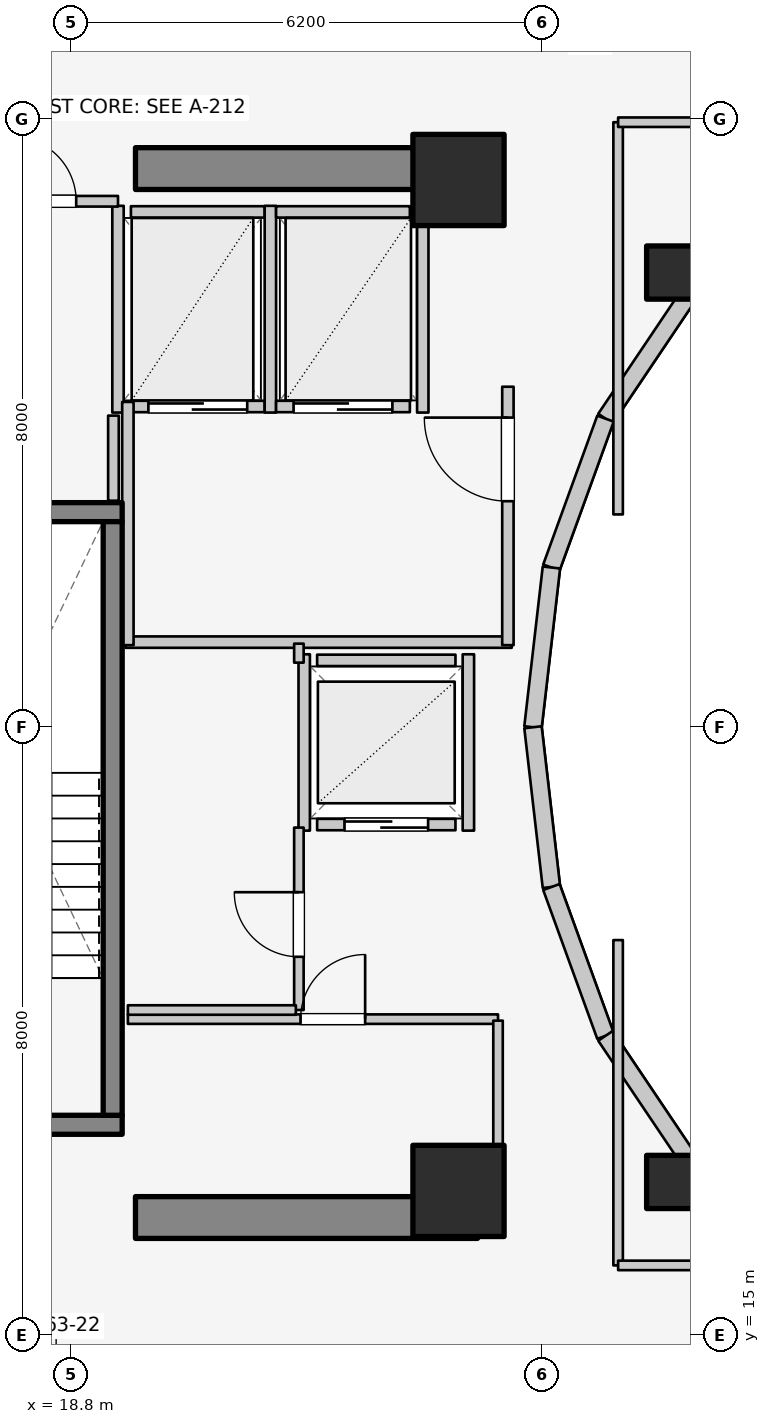
"""IFC4 building model, lengths in metres.
Left out: names, types, materials, properties, quantities, classifications, styles, units other than length and angle.
Written with IfcOpenShell. Run it as: python <this file> out.ifc"""

import sys

from ifc_helpers import new_model, si_unit, direction, frame, frame_2d, origin, origin_2d, place, context, subcontext, project, spatial, rectangle, extrude, element, fill, save


model = new_model("IFC4")
c1 = context("Model", 3, precision=1e-05, world=origin(), true_north=direction((0.0, 1.0)))
c2 = subcontext(c1, "Body", "Model", "MODEL_VIEW")
j1 = project(units=[si_unit("LENGTHUNIT", "METRE"), si_unit("PLANEANGLEUNIT", "RADIAN")], contexts=[c1])
p1 = place(None, origin())
s1 = spatial("IfcSite", under=j1, at=p1, CompositionType="ELEMENT")
p2 = place(p1, origin())
s2 = spatial("IfcBuilding", under=s1, at=p2, CompositionType="ELEMENT")
p3 = place(p2, frame((0.0, 0.0, 207.8)))
s3 = spatial("IfcBuildingStorey", under=s2, at=p3, CompositionType="ELEMENT", Elevation=207.8)
for number, where, z_axis, x_axis in (
    (1, (19.65, 16.55, 0.0), (0.0, 0.0, 1.0), (1.0, 0.0, 0.0)),
    (2, (19.65, 30.35, 0.0), (0.0, 0.0, 1.0), (1.0, 0.0, 0.0)),
):
    element("IfcWall", number, at=place(p3, frame(where, z_axis=z_axis, x_axis=x_axis)), inside=s3, PredefinedType="SHEAR", context=c2, shape_type="SweptSolid", body=[
        extrude(rectangle(XDim=4.5, YDim=0.55, at=frame_2d((2.25, 0.0))), origin(), (0.0, 0.0, 1.0), 3.1),
    ])
p4 = place(p3, frame((16.105, 17.77, 0.0), z_axis=(0.0, 0.0, 1.0), x_axis=(1.0, 0.0, 0.0)))
e3 = element("IfcWall", 3, at=p4, inside=s3, PredefinedType="SOLIDWALL", context=c2, shape_type="SweptSolid", body=[
    extrude(rectangle(XDim=3.37, YDim=0.25, at=frame_2d((1.685, 0.0))), origin(), (0.0, 0.0, 1.0), 3.1),
])
p5 = place(p4, frame((1.135, 0.0, 0.0)))
e4 = element("IfcOpeningElement", 4, at=p5, cuts=e3, PredefinedType="OPENING", context=c2, shape_type="SweptSolid", body=[
    extrude(rectangle(XDim=1.1, YDim=2.1, at=frame_2d((0.55, 1.05))), frame((0.0, 0.135, 0.0), z_axis=(0.0, -1.0, 0.0), x_axis=(1.0, 0.0, 0.0)), (0.0, 0.0, 1.0), 0.27),
])
p6 = place(p3, frame((16.105, 25.83, 0.0), z_axis=(0.0, 0.0, 1.0), x_axis=(1.0, 0.0, 0.0)))
e5 = element("IfcWall", 5, at=p6, inside=s3, PredefinedType="SOLIDWALL", context=c2, shape_type="SweptSolid", body=[
    extrude(rectangle(XDim=3.37, YDim=0.25, at=frame_2d((1.685, 0.0))), origin(), (0.0, 0.0, 1.0), 3.1),
])
p7 = place(p3, frame((19.35, 17.895, 0.0), z_axis=(0.0, 0.0, 1.0), x_axis=(0.0, 1.0, 0.0)))
e6 = element("IfcWall", 6, at=p7, inside=s3, PredefinedType="SOLIDWALL", context=c2, shape_type="SweptSolid", body=[
    extrude(rectangle(XDim=7.81, YDim=0.25, at=frame_2d((3.905, 0.0))), origin(), (0.0, 0.0, 1.0), 3.1),
])
for number, where, z_axis, x_axis in (
    (7, (23.9, 16.9, 0.0), (0.0, 0.0, 1.0), (1.0, 0.0, 0.0)),
    (8, (23.9, 30.2, 0.0), (0.0, 0.0, 1.0), (1.0, 0.0, 0.0)),
):
    element("IfcColumn", number, at=place(p3, frame(where, z_axis=z_axis, x_axis=x_axis)), inside=s3, PredefinedType="COLUMN", context=c2, shape_type="SweptSolid", body=[
        extrude(rectangle(XDim=1.2, YDim=1.2, at=origin_2d()), origin(), (0.0, 0.0, 1.0), 3.1),
    ])
for number, where, z_axis, x_axis in (
    (9, (26.725, 28.982, 0.0), (0.0, 0.0, 1.0), (1.0, 0.0, 0.0)),
    (10, (26.725, 17.018, 0.0), (0.0, 0.0, 1.0), (1.0, 0.0, 0.0)),
):
    element("IfcColumn", number, at=place(p3, frame(where, z_axis=z_axis, x_axis=x_axis)), inside=s3, PredefinedType="COLUMN", context=c2, shape_type="SweptSolid", body=[
        extrude(rectangle(XDim=0.7, YDim=0.7, at=origin_2d()), origin(), (0.0, 0.0, 1.0), 3.1),
    ])
p8 = place(p3, frame((28.44, 30.032, 0.0), z_axis=(0.0, 0.0, 1.0), x_axis=(-0.752576694707, -0.658504607869, 0.0)))
e11 = element("IfcWall", 11, at=p8, inside=s3, PredefinedType="STANDARD", context=c2, shape_type="SweptSolid", body=[
    extrude(rectangle(XDim=1.959, YDim=0.23, at=frame_2d((0.98, 0.0))), origin(), (0.0, 0.0, 1.0), 1.22),
])
p9 = place(p3, frame((26.965, 28.742, 0.0), z_axis=(0.0, 0.0, 1.0), x_axis=(-0.558197800898, -0.829707909492, 0.0)))
e12 = element("IfcWall", 12, at=p9, inside=s3, PredefinedType="STANDARD", context=c2, shape_type="SweptSolid", body=[
    extrude(rectangle(XDim=2.027, YDim=0.23, at=frame_2d((1.013, 0.0))), origin(), (0.0, 0.0, 1.0), 1.22),
])
p10 = place(p3, frame((25.834, 27.06, 0.0), z_axis=(0.0, 0.0, 1.0), x_axis=(-0.341423187295, -0.93990968033, 0.0)))
e13 = element("IfcWall", 13, at=p10, inside=s3, PredefinedType="STANDARD", context=c2, shape_type="SweptSolid", body=[
    extrude(rectangle(XDim=2.084, YDim=0.23, at=frame_2d((1.042, 0.0))), origin(), (0.0, 0.0, 1.0), 2.56),
])
for number, where, z_axis, x_axis in (
    (14, (25.123, 25.102, 0.0), (0.0, 0.0, 1.0), (-0.115, -0.993, 0.0)),
    (15, (24.88, 23.0, 0.0), (0.0, 0.0, 1.0), (0.115, -0.993, 0.0)),
):
    element("IfcWall", number, at=place(p3, frame(where, z_axis=z_axis, x_axis=x_axis)), inside=s3, PredefinedType="STANDARD", context=c2, shape_type="SweptSolid", body=[
        extrude(rectangle(XDim=2.115, YDim=0.23, at=frame_2d((1.058, 0.0))), origin(), (0.0, 0.0, 1.0), 2.56),
    ])
p11 = place(p3, frame((25.123, 20.898, 0.0), z_axis=(0.0, 0.0, 1.0), x_axis=(0.341423187295, -0.93990968033, 0.0)))
e16 = element("IfcWall", 16, at=p11, inside=s3, PredefinedType="STANDARD", context=c2, shape_type="SweptSolid", body=[
    extrude(rectangle(XDim=2.084, YDim=0.23, at=frame_2d((1.042, 0.0))), origin(), (0.0, 0.0, 1.0), 2.56),
])
p12 = place(p3, frame((25.834, 18.94, 0.0), z_axis=(0.0, 0.0, 1.0), x_axis=(0.558197800898, -0.829707909492, 0.0)))
e17 = element("IfcWall", 17, at=p12, inside=s3, PredefinedType="STANDARD", context=c2, shape_type="SweptSolid", body=[
    extrude(rectangle(XDim=2.027, YDim=0.23, at=frame_2d((1.013, 0.0))), origin(), (0.0, 0.0, 1.0), 1.22),
])
p13 = place(p3, frame((26.965, 17.258, 0.0), z_axis=(0.0, 0.0, 1.0), x_axis=(0.752576694707, -0.658504607869, 0.0)))
e18 = element("IfcWall", 18, at=p13, inside=s3, PredefinedType="STANDARD", context=c2, shape_type="SweptSolid", body=[
    extrude(rectangle(XDim=1.959, YDim=0.23, at=frame_2d((0.98, 0.0))), origin(), (0.0, 0.0, 1.0), 1.22),
])
p14 = place(p3, frame((22.04, 21.72, 0.0), z_axis=(0.0, 0.0, 1.0), x_axis=(1.0, 0.0, 0.0)))
e19 = element("IfcWall", 19, at=p14, inside=s3, PredefinedType="SOLIDWALL", context=c2, shape_type="SweptSolid", body=[
    extrude(rectangle(XDim=1.82, YDim=0.15, at=frame_2d((0.91, 0.0))), origin(), (0.0, 0.0, 1.0), 2.12),
])
p15 = place(p14, frame((0.36, 0.0, 0.0)))
e20 = element("IfcOpeningElement", 20, at=p15, cuts=e19, PredefinedType="OPENING", context=c2, shape_type="SweptSolid", body=[
    extrude(rectangle(XDim=1.1, YDim=2.1, at=frame_2d((0.55, 1.05))), frame((0.0, 0.085, 0.0), z_axis=(0.0, -1.0, 0.0), x_axis=(1.0, 0.0, 0.0)), (0.0, 0.0, 1.0), 0.17),
])
p16 = place(p3, frame((22.04, 23.88, 0.0), z_axis=(0.0, 0.0, 1.0), x_axis=(1.0, 0.0, 0.0)))
e21 = element("IfcWall", 21, at=p16, inside=s3, PredefinedType="SOLIDWALL", context=c2, shape_type="SweptSolid", body=[
    extrude(rectangle(XDim=1.82, YDim=0.15, at=frame_2d((0.91, 0.0))), origin(), (0.0, 0.0, 1.0), 2.12),
])
p17 = place(p3, frame((21.87, 21.64, 0.0), z_axis=(0.0, 0.0, 1.0), x_axis=(0.0, 1.0, 0.0)))
e22 = element("IfcWall", 22, at=p17, inside=s3, PredefinedType="SOLIDWALL", context=c2, shape_type="SweptSolid", body=[
    extrude(rectangle(XDim=2.32, YDim=0.15, at=frame_2d((1.16, 0.0))), origin(), (0.0, 0.0, 1.0), 2.575),
])
p18 = place(p3, frame((24.03, 21.64, 0.0), z_axis=(0.0, 0.0, 1.0), x_axis=(0.0, 1.0, 0.0)))
e23 = element("IfcWall", 23, at=p18, inside=s3, PredefinedType="SOLIDWALL", context=c2, shape_type="SweptSolid", body=[
    extrude(rectangle(XDim=2.32, YDim=0.15, at=frame_2d((1.16, 0.0))), origin(), (0.0, 0.0, 1.0), 2.12),
])
p19 = place(p3, frame((19.59, 27.22, 0.0), z_axis=(0.0, 0.0, 1.0), x_axis=(1.0, 0.0, 0.0)))
e24 = element("IfcWall", 24, at=p19, inside=s3, PredefinedType="SOLIDWALL", context=c2, shape_type="SweptSolid", body=[
    extrude(rectangle(XDim=1.76, YDim=0.15, at=frame_2d((0.88, 0.0))), origin(), (0.0, 0.0, 1.0), 2.575),
])
p20 = place(p19, frame((0.23, 0.0, 0.0)))
e25 = element("IfcOpeningElement", 25, at=p20, cuts=e24, PredefinedType="OPENING", context=c2, shape_type="SweptSolid", body=[
    extrude(rectangle(XDim=1.3, YDim=2.1, at=frame_2d((0.65, 1.05))), frame((0.0, 0.085, 0.0), z_axis=(0.0, -1.0, 0.0), x_axis=(1.0, 0.0, 0.0)), (0.0, 0.0, 1.0), 0.17),
])
p21 = place(p3, frame((19.59, 29.78, 0.0), z_axis=(0.0, 0.0, 1.0), x_axis=(1.0, 0.0, 0.0)))
e26 = element("IfcWall", 26, at=p21, inside=s3, PredefinedType="SOLIDWALL", context=c2, shape_type="SweptSolid", body=[
    extrude(rectangle(XDim=1.76, YDim=0.15, at=frame_2d((0.88, 0.0))), origin(), (0.0, 0.0, 1.0), 2.575),
])
for number, where, z_axis, x_axis in (
    (27, (19.42, 27.14, 0.0), (0.0, 0.0, 1.0), (0.0, 1.0, 0.0)),
    (28, (21.425, 27.14, 0.0), (0.0, 0.0, 1.0), (0.0, 1.0, 0.0)),
):
    element("IfcWall", number, at=place(p3, frame(where, z_axis=z_axis, x_axis=x_axis)), inside=s3, PredefinedType="SOLIDWALL", context=c2, shape_type="SweptSolid", body=[
        extrude(rectangle(XDim=2.72, YDim=0.15, at=frame_2d((1.36, 0.0))), origin(), (0.0, 0.0, 1.0), 2.575),
    ])
p22 = place(p3, frame((21.5, 27.22, 0.0), z_axis=(0.0, 0.0, 1.0), x_axis=(1.0, 0.0, 0.0)))
e29 = element("IfcWall", 29, at=p22, inside=s3, PredefinedType="SOLIDWALL", context=c2, shape_type="SweptSolid", body=[
    extrude(rectangle(XDim=1.76, YDim=0.15, at=frame_2d((0.88, 0.0))), origin(), (0.0, 0.0, 1.0), 2.575),
])
p23 = place(p22, frame((0.23, 0.0, 0.0)))
e30 = element("IfcOpeningElement", 30, at=p23, cuts=e29, PredefinedType="OPENING", context=c2, shape_type="SweptSolid", body=[
    extrude(rectangle(XDim=1.3, YDim=2.1, at=frame_2d((0.65, 1.05))), frame((0.0, 0.085, 0.0), z_axis=(0.0, -1.0, 0.0), x_axis=(1.0, 0.0, 0.0)), (0.0, 0.0, 1.0), 0.17),
])
p24 = place(p3, frame((21.5, 29.78, 0.0), z_axis=(0.0, 0.0, 1.0), x_axis=(1.0, 0.0, 0.0)))
e31 = element("IfcWall", 31, at=p24, inside=s3, PredefinedType="SOLIDWALL", context=c2, shape_type="SweptSolid", body=[
    extrude(rectangle(XDim=1.76, YDim=0.15, at=frame_2d((0.88, 0.0))), origin(), (0.0, 0.0, 1.0), 2.575),
])
p25 = place(p3, frame((23.43, 27.14, 0.0), z_axis=(0.0, 0.0, 1.0), x_axis=(0.0, 1.0, 0.0)))
e32 = element("IfcWall", 32, at=p25, inside=s3, PredefinedType="SOLIDWALL", context=c2, shape_type="SweptSolid", body=[
    extrude(rectangle(XDim=2.72, YDim=0.15, at=frame_2d((1.36, 0.0))), origin(), (0.0, 0.0, 1.0), 2.575),
])
p26 = place(p3, frame((19.52, 24.12, 0.0), z_axis=(0.0, 0.0, 1.0), x_axis=(1.0, 0.0, 0.0)))
e33 = element("IfcWall", 33, at=p26, inside=s3, PredefinedType="PARTITIONING", context=c2, shape_type="SweptSolid", body=[
    extrude(rectangle(XDim=5.08, YDim=0.15, at=frame_2d((2.54, 0.0))), origin(), (0.0, 0.0, 1.0), 2.12),
])
p27 = place(p3, frame((19.55, 24.08, 0.0), z_axis=(0.0, 0.0, 1.0), x_axis=(0.0, 1.0, 0.0)))
e34 = element("IfcWall", 34, at=p27, inside=s3, PredefinedType="PARTITIONING", context=c2, shape_type="SweptSolid", body=[
    extrude(rectangle(XDim=3.2, YDim=0.15, at=frame_2d((1.6, 0.0))), origin(), (0.0, 0.0, 1.0), 2.575),
])
p28 = place(p3, frame((24.55, 24.08, 0.0), z_axis=(0.0, 0.0, 1.0), x_axis=(0.0, 1.0, 0.0)))
e35 = element("IfcWall", 35, at=p28, inside=s3, PredefinedType="PARTITIONING", context=c2, shape_type="SweptSolid", body=[
    extrude(rectangle(XDim=3.4, YDim=0.15, at=frame_2d((1.7, 0.0))), origin(), (0.0, 0.0, 1.0), 2.575),
])
p29 = place(p28, frame((1.894, 0.0, 0.0)))
e36 = element("IfcOpeningElement", 36, at=p29, cuts=e35, PredefinedType="OPENING", context=c2, shape_type="SweptSolid", body=[
    extrude(rectangle(XDim=1.1, YDim=2.1, at=frame_2d((0.55, 1.05))), frame((0.0, 0.085, 0.0), z_axis=(0.0, -1.0, 0.0), x_axis=(1.0, 0.0, 0.0)), (0.0, 0.0, 1.0), 0.17),
])
p30 = place(p3, frame((19.55, 19.16, 0.0), z_axis=(0.0, 0.0, 1.0), x_axis=(1.0, 0.0, 0.0)))
e37 = element("IfcWall", 37, at=p30, inside=s3, PredefinedType="PARTITIONING", context=c2, shape_type="SweptSolid", body=[
    extrude(rectangle(XDim=4.87, YDim=0.125, at=frame_2d((2.435, 0.0))), origin(), (0.0, 0.0, 1.0), 2.12),
])
p31 = place(p30, frame((2.272, 0.0, 0.0)))
e38 = element("IfcOpeningElement", 38, at=p31, cuts=e37, PredefinedType="OPENING", context=c2, shape_type="SweptSolid", body=[
    extrude(rectangle(XDim=0.85, YDim=2.05, at=frame_2d((0.425, 1.025))), frame((0.0, 0.073, 0.0), z_axis=(0.0, -1.0, 0.0), x_axis=(1.0, 0.0, 0.0)), (0.0, 0.0, 1.0), 0.145),
])
p32 = place(p3, frame((24.42, 17.1, 0.0), z_axis=(0.0, 0.0, 1.0), x_axis=(0.0, 1.0, 0.0)))
e39 = element("IfcWall", 39, at=p32, inside=s3, PredefinedType="PARTITIONING", context=c2, shape_type="SweptSolid", body=[
    extrude(rectangle(XDim=2.04, YDim=0.125, at=frame_2d((1.02, 0.0))), origin(), (0.0, 0.0, 1.0), 1.952),
])
p33 = place(p3, frame((21.8, 19.28, 0.0), z_axis=(0.0, 0.0, 1.0), x_axis=(0.0, 1.0, 0.0)))
e40 = element("IfcWall", 40, at=p33, inside=s3, PredefinedType="PARTITIONING", context=c2, shape_type="SweptSolid", body=[
    extrude(rectangle(XDim=2.4, YDim=0.125, at=frame_2d((1.2, 0.0))), origin(), (0.0, 0.0, 1.0), 2.575),
])
p34 = place(p33, frame((0.7, 0.0, 0.0)))
e41 = element("IfcOpeningElement", 41, at=p34, cuts=e40, PredefinedType="OPENING", context=c2, shape_type="SweptSolid", body=[
    extrude(rectangle(XDim=0.85, YDim=2.05, at=frame_2d((0.425, 1.025))), frame((0.0, 0.073, 0.0), z_axis=(0.0, -1.0, 0.0), x_axis=(1.0, 0.0, 0.0)), (0.0, 0.0, 1.0), 0.145),
])
p35 = place(p3, frame((21.8, 23.85, 0.0), z_axis=(0.0, 0.0, 1.0), x_axis=(0.0, 1.0, 0.0)))
e42 = element("IfcWall", 42, at=p35, inside=s3, PredefinedType="PARTITIONING", context=c2, shape_type="SweptSolid", body=[
    extrude(rectangle(XDim=0.25, YDim=0.125, at=frame_2d((0.125, 0.0))), origin(), (0.0, 0.0, 1.0), 2.575),
])
p36 = place(p3, frame((19.55, 19.28, 0.0), z_axis=(0.0, 0.0, 1.0), x_axis=(1.0, 0.0, 0.0)))
e43 = element("IfcWall", 43, at=p36, inside=s3, PredefinedType="PARTITIONING", context=c2, shape_type="SweptSolid", body=[
    extrude(rectangle(XDim=2.21, YDim=0.125, at=frame_2d((1.105, 0.0))), origin(), (0.0, 0.0, 1.0), 2.12),
])
p37 = place(p3, frame((17.52, 29.92, 0.0), z_axis=(0.0, 0.0, 1.0), x_axis=(1.0, 0.0, 0.0)))
e44 = element("IfcWall", 44, at=p37, inside=s3, PredefinedType="PLUMBINGWALL", context=c2, shape_type="SweptSolid", body=[
    extrude(rectangle(XDim=1.9, YDim=0.14, at=frame_2d((0.95, 0.0))), origin(), (0.0, 0.0, 1.0), 2.575),
])
p38 = place(p37, frame((0.5, 0.0, 0.0)))
e45 = element("IfcOpeningElement", 45, at=p38, cuts=e44, PredefinedType="OPENING", context=c2, shape_type="SweptSolid", body=[
    extrude(rectangle(XDim=0.85, YDim=2.05, at=frame_2d((0.425, 1.025))), frame((0.0, 0.08, 0.0), z_axis=(0.0, -1.0, 0.0), x_axis=(1.0, 0.0, 0.0)), (0.0, 0.0, 1.0), 0.16),
])
p39 = place(p3, frame((19.36, 25.98, 0.0), z_axis=(0.0, 0.0, 1.0), x_axis=(0.0, 1.0, 0.0)))
e46 = element("IfcWall", 46, at=p39, inside=s3, PredefinedType="PLUMBINGWALL", context=c2, shape_type="SweptSolid", body=[
    extrude(rectangle(XDim=1.12, YDim=0.14, at=frame_2d((0.56, 0.0))), origin(), (0.0, 0.0, 1.0), 2.575),
])
p40 = place(p3, frame((28.45, 30.015, 0.0), z_axis=(0.0, 0.0, 1.0), x_axis=(-0.523992004803, 0.851723182086, 0.0)))
e47 = element("IfcWall", 47, at=p40, inside=s3, PredefinedType="PARTITIONING", context=c2, shape_type="SweptSolid", body=[
    extrude(rectangle(XDim=3.101, YDim=0.125, at=frame_2d((1.551, 0.0))), origin(), (0.0, 0.0, 1.0), 2.096),
])
p41 = place(p3, frame((26.0, 25.8, 0.0), z_axis=(0.0, 0.0, 1.0), x_axis=(0.0, 1.0, 0.0)))
e48 = element("IfcWall", 48, at=p41, inside=s3, PredefinedType="PARTITIONING", context=c2, shape_type="SweptSolid", body=[
    extrude(rectangle(XDim=5.16, YDim=0.125, at=frame_2d((2.58, 0.0))), origin(), (0.0, 0.0, 1.0), 1.952),
])
p42 = place(p3, frame((26.0, 30.96, 0.0), z_axis=(0.0, 0.0, 1.0), x_axis=(1.0, 0.0, 0.0)))
e49 = element("IfcWall", 49, at=p42, inside=s3, PredefinedType="PARTITIONING", context=c2, shape_type="SweptSolid", body=[
    extrude(rectangle(XDim=2.6, YDim=0.125, at=frame_2d((1.3, 0.0))), origin(), (0.0, 0.0, 1.0), 2.096),
])
p43 = place(p3, frame((26.0, 15.92, 0.0), z_axis=(0.0, 0.0, 1.0), x_axis=(0.0, 1.0, 0.0)))
e50 = element("IfcWall", 50, at=p43, inside=s3, PredefinedType="PARTITIONING", context=c2, shape_type="SweptSolid", body=[
    extrude(rectangle(XDim=4.28, YDim=0.125, at=frame_2d((2.14, 0.0))), origin(), (0.0, 0.0, 1.0), 1.22),
])
p44 = place(p3, frame((26.0, 15.92, 0.0), z_axis=(0.0, 0.0, 1.0), x_axis=(1.0, 0.0, 0.0)))
e51 = element("IfcWall", 51, at=p44, inside=s3, PredefinedType="PARTITIONING", context=c2, shape_type="SweptSolid", body=[
    extrude(rectangle(XDim=2.6, YDim=0.125, at=frame_2d((1.3, 0.0))), origin(), (0.0, 0.0, 1.0), 1.22),
])
p45 = place(p15, origin())
e52 = element("IfcDoor", 52, at=p45, inside=s3, OperationType="DOUBLE_DOOR_SLIDING", PredefinedType="DOOR", context=c2, shape_type="SweptSolid", body=[
    extrude(rectangle(XDim=1.1, YDim=2.1, at=frame_2d((0.55, 1.05))), frame((0.0, 0.025, 0.0), z_axis=(0.0, -1.0, 0.0), x_axis=(1.0, 0.0, 0.0)), (0.0, 0.0, 1.0), 0.05),
])
fill(e20, e52)
p46 = place(p20, origin())
e53 = element("IfcDoor", 53, at=p46, inside=s3, OperationType="DOUBLE_DOOR_SLIDING", PredefinedType="DOOR", context=c2, shape_type="SweptSolid", body=[
    extrude(rectangle(XDim=1.3, YDim=2.1, at=frame_2d((0.65, 1.05))), frame((0.0, 0.025, 0.0), z_axis=(0.0, -1.0, 0.0), x_axis=(1.0, 0.0, 0.0)), (0.0, 0.0, 1.0), 0.05),
])
fill(e25, e53)
p47 = place(p23, origin())
e54 = element("IfcDoor", 54, at=p47, inside=s3, OperationType="DOUBLE_DOOR_SLIDING", PredefinedType="DOOR", context=c2, shape_type="SweptSolid", body=[
    extrude(rectangle(XDim=1.3, YDim=2.1, at=frame_2d((0.65, 1.05))), frame((0.0, 0.025, 0.0), z_axis=(0.0, -1.0, 0.0), x_axis=(1.0, 0.0, 0.0)), (0.0, 0.0, 1.0), 0.05),
])
fill(e30, e54)
p48 = place(p29, origin())
e55 = element("IfcDoor", 55, at=p48, inside=s3, OperationType="SINGLE_SWING_RIGHT", PredefinedType="DOOR", context=c2, shape_type="SweptSolid", body=[
    extrude(rectangle(XDim=1.1, YDim=2.1, at=frame_2d((0.55, 1.05))), frame((0.0, 0.025, 0.0), z_axis=(0.0, -1.0, 0.0), x_axis=(1.0, 0.0, 0.0)), (0.0, 0.0, 1.0), 0.05),
])
fill(e36, e55)
p49 = place(p31, origin())
e56 = element("IfcDoor", 56, at=p49, inside=s3, OperationType="SINGLE_SWING_RIGHT", PredefinedType="DOOR", context=c2, shape_type="SweptSolid", body=[
    extrude(rectangle(XDim=0.85, YDim=2.05, at=frame_2d((0.425, 1.025))), frame((0.0, 0.025, 0.0), z_axis=(0.0, -1.0, 0.0), x_axis=(1.0, 0.0, 0.0)), (0.0, 0.0, 1.0), 0.05),
])
fill(e38, e56)
p50 = place(p34, origin())
e57 = element("IfcDoor", 57, at=p50, inside=s3, OperationType="SINGLE_SWING_RIGHT", PredefinedType="DOOR", context=c2, shape_type="SweptSolid", body=[
    extrude(rectangle(XDim=0.85, YDim=2.05, at=frame_2d((0.425, 1.025))), frame((0.0, 0.025, 0.0), z_axis=(0.0, -1.0, 0.0), x_axis=(1.0, 0.0, 0.0)), (0.0, 0.0, 1.0), 0.05),
])
fill(e41, e57)
p51 = place(p38, origin())
e58 = element("IfcDoor", 58, at=p51, inside=s3, OperationType="SINGLE_SWING_LEFT", PredefinedType="DOOR", context=c2, shape_type="SweptSolid", body=[
    extrude(rectangle(XDim=0.85, YDim=2.05, at=frame_2d((0.425, 1.025))), frame((0.0, 0.025, 0.0), z_axis=(0.0, -1.0, 0.0), x_axis=(1.0, 0.0, 0.0)), (0.0, 0.0, 1.0), 0.05),
])
fill(e45, e58)
save(model, sys.argv[1])
